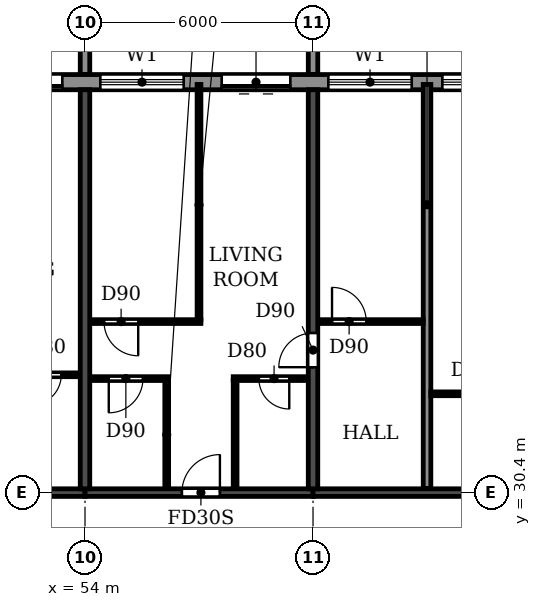
"""IFC4 building model, lengths in metres.
Left out: names, types, materials, properties, quantities, classifications, styles, units other than length and angle.
Written with IfcOpenShell. Run it as: python <this file> out.ifc"""

import sys

from ifc_helpers import new_model, si_unit, direction, frame, frame_2d, origin, place, context, subcontext, project, spatial, polyline, rectangle, outline, extrude, source, transform, mapped, element, fill, save


model = new_model("IFC4")
c1 = context("Model", 3, precision=1e-05, world=origin(), true_north=direction((0.0, 1.0)))
c2 = subcontext(c1, "Body", "Model", "MODEL_VIEW")
j1 = project(units=[si_unit("LENGTHUNIT", "METRE"), si_unit("PLANEANGLEUNIT", "RADIAN")], contexts=[c1])
p1 = place(None, origin())
s1 = spatial("IfcSite", under=j1, at=p1, CompositionType="ELEMENT")
p2 = place(p1, origin())
s2 = spatial("IfcBuilding", under=s1, at=p2, CompositionType="ELEMENT")
p3 = place(p2, frame((0.0, 0.0, 175.2)))
s3 = spatial("IfcBuildingStorey", under=s2, at=p3, CompositionType="ELEMENT", Elevation=175.2)
p4 = place(p3, frame((54.0, 30.5, 0.0), z_axis=(0.0, 0.0, 1.0), x_axis=(0.0, 1.0, 0.0)))
e1 = element("IfcWall", 1, at=p4, inside=s3, PredefinedType="SHEAR", context=c2, shape_type="SweptSolid", body=[
    extrude(rectangle(XDim=10.5, YDim=0.25, at=frame_2d((5.25, 0.0))), origin(), (0.0, 0.0, 1.0), 3.08),
])
p5 = place(p3, frame((60.0, 30.5, 0.0), z_axis=(0.0, 0.0, 1.0), x_axis=(0.0, 1.0, 0.0)))
e2 = element("IfcWall", 2, at=p5, inside=s3, PredefinedType="SHEAR", context=c2, shape_type="SweptSolid", body=[
    extrude(rectangle(XDim=10.5, YDim=0.25, at=frame_2d((5.25, 0.0))), origin(), (0.0, 0.0, 1.0), 3.08),
])
p6 = place(p5, frame((3.2, 0.0, 0.0)))
e3 = element("IfcOpeningElement", 3, at=p6, cuts=e2, PredefinedType="OPENING", context=c2, shape_type="SweptSolid", body=[
    extrude(rectangle(XDim=0.9, YDim=2.1, at=frame_2d((0.45, 1.05))), frame((0.0, 0.135, 0.0), z_axis=(0.0, -1.0, 0.0), x_axis=(1.0, 0.0, 0.0)), (0.0, 0.0, 1.0), 0.27),
])
p7 = place(p3, frame((48.0, 30.4, 0.0), z_axis=(0.0, 0.0, 1.0), x_axis=(1.0, 0.0, 0.0)))
e4 = element("IfcWall", 4, at=p7, inside=s3, PredefinedType="SHEAR", context=c2, shape_type="SweptSolid", body=[
    extrude(rectangle(XDim=6.0, YDim=0.2, at=frame_2d((3.0, 0.0))), origin(), (0.0, 0.0, 1.0), 2.48),
])
p8 = place(p7, frame((2.55, 0.0, 0.0)))
e5 = element("IfcOpeningElement", 5, at=p8, cuts=e4, PredefinedType="OPENING", context=c2, shape_type="SweptSolid", body=[
    extrude(rectangle(XDim=1.0, YDim=2.1, at=frame_2d((0.5, 1.05))), frame((0.0, 0.11, 0.0), z_axis=(0.0, -1.0, 0.0), x_axis=(1.0, 0.0, 0.0)), (0.0, 0.0, 1.0), 0.22),
])
p9 = place(p3, frame((54.0, 30.4, 0.0), z_axis=(0.0, 0.0, 1.0), x_axis=(1.0, 0.0, 0.0)))
e6 = element("IfcWall", 6, at=p9, inside=s3, PredefinedType="SHEAR", context=c2, shape_type="SweptSolid", body=[
    extrude(rectangle(XDim=6.0, YDim=0.2, at=frame_2d((3.0, 0.0))), origin(), (0.0, 0.0, 1.0), 2.48),
])
p10 = place(p9, frame((2.55, 0.0, 0.0)))
e7 = element("IfcOpeningElement", 7, at=p10, cuts=e6, PredefinedType="OPENING", context=c2, shape_type="SweptSolid", body=[
    extrude(rectangle(XDim=1.0, YDim=2.1, at=frame_2d((0.5, 1.05))), frame((0.0, 0.11, 0.0), z_axis=(0.0, -1.0, 0.0), x_axis=(1.0, 0.0, 0.0)), (0.0, 0.0, 1.0), 0.22),
])
p11 = place(p3, frame((60.0, 30.4, 0.0), z_axis=(0.0, 0.0, 1.0), x_axis=(1.0, 0.0, 0.0)))
e8 = element("IfcWall", 8, at=p11, inside=s3, PredefinedType="SHEAR", context=c2, shape_type="SweptSolid", body=[
    extrude(rectangle(XDim=6.0, YDim=0.2, at=frame_2d((3.0, 0.0))), origin(), (0.0, 0.0, 1.0), 2.48),
])
p12 = place(p3, frame((79.317, 41.2, 0.0), z_axis=(0.0, 0.0, 1.0), x_axis=(-1.0, 0.0, 0.0)))
e9 = element("IfcWall", 9, at=p12, inside=s3, PredefinedType="STANDARD", context=c2, shape_type="SweptSolid", body=[
    extrude(rectangle(XDim=56.634, YDim=0.4, at=frame_2d((28.317, 0.0))), origin(), (0.0, 0.0, 1.0), 3.08),
])
p13 = place(p12, frame((52.717, 0.0, 0.9)))
e10 = element("IfcOpeningElement", 10, at=p13, cuts=e9, PredefinedType="OPENING", context=c2, shape_type="SweptSolid", body=[
    extrude(rectangle(XDim=2.2, YDim=1.5, at=frame_2d((1.1, 0.75))), frame((0.0, 0.21, 0.0), z_axis=(0.0, -1.0, 0.0), x_axis=(1.0, 0.0, 0.0)), (0.0, 0.0, 1.0), 0.42),
])
p14 = place(p12, frame((49.917, 0.0, 0.0)))
e11 = element("IfcOpeningElement", 11, at=p14, cuts=e9, PredefinedType="OPENING", context=c2, shape_type="SweptSolid", body=[
    extrude(rectangle(XDim=1.8, YDim=2.4, at=frame_2d((0.9, 1.2))), frame((0.0, 0.21, 0.0), z_axis=(0.0, -1.0, 0.0), x_axis=(1.0, 0.0, 0.0)), (0.0, 0.0, 1.0), 0.42),
])
p15 = place(p12, frame((46.717, 0.0, 0.9)))
e12 = element("IfcOpeningElement", 12, at=p15, cuts=e9, PredefinedType="OPENING", context=c2, shape_type="SweptSolid", body=[
    extrude(rectangle(XDim=2.2, YDim=1.5, at=frame_2d((1.1, 0.75))), frame((0.0, 0.21, 0.0), z_axis=(0.0, -1.0, 0.0), x_axis=(1.0, 0.0, 0.0)), (0.0, 0.0, 1.0), 0.42),
])
p16 = place(p12, frame((43.717, 0.0, 0.9)))
e13 = element("IfcOpeningElement", 13, at=p16, cuts=e9, PredefinedType="OPENING", context=c2, shape_type="SweptSolid", body=[
    extrude(rectangle(XDim=2.2, YDim=1.5, at=frame_2d((1.1, 0.75))), frame((0.0, 0.21, 0.0), z_axis=(0.0, -1.0, 0.0), x_axis=(1.0, 0.0, 0.0)), (0.0, 0.0, 1.0), 0.42),
])
p17 = place(p12, frame((40.917, 0.0, 0.0)))
e14 = element("IfcOpeningElement", 14, at=p17, cuts=e9, PredefinedType="OPENING", context=c2, shape_type="SweptSolid", body=[
    extrude(rectangle(XDim=1.8, YDim=2.4, at=frame_2d((0.9, 1.2))), frame((0.0, 0.21, 0.0), z_axis=(0.0, -1.0, 0.0), x_axis=(1.0, 0.0, 0.0)), (0.0, 0.0, 1.0), 0.42),
])
p18 = place(p12, frame((37.717, 0.0, 0.9)))
e15 = element("IfcOpeningElement", 15, at=p18, cuts=e9, PredefinedType="OPENING", context=c2, shape_type="SweptSolid", body=[
    extrude(rectangle(XDim=2.2, YDim=1.5, at=frame_2d((1.1, 0.75))), frame((0.0, 0.21, 0.0), z_axis=(0.0, -1.0, 0.0), x_axis=(1.0, 0.0, 0.0)), (0.0, 0.0, 1.0), 0.42),
])
p19 = place(p12, frame((34.717, 0.0, 0.9)))
e16 = element("IfcOpeningElement", 16, at=p19, cuts=e9, PredefinedType="OPENING", context=c2, shape_type="SweptSolid", body=[
    extrude(rectangle(XDim=2.2, YDim=1.5, at=frame_2d((1.1, 0.75))), frame((0.0, 0.21, 0.0), z_axis=(0.0, -1.0, 0.0), x_axis=(1.0, 0.0, 0.0)), (0.0, 0.0, 1.0), 0.42),
])
p20 = place(p12, frame((31.717, 0.0, 0.9)))
e17 = element("IfcOpeningElement", 17, at=p20, cuts=e9, PredefinedType="OPENING", context=c2, shape_type="SweptSolid", body=[
    extrude(rectangle(XDim=2.2, YDim=1.5, at=frame_2d((1.1, 0.75))), frame((0.0, 0.21, 0.0), z_axis=(0.0, -1.0, 0.0), x_axis=(1.0, 0.0, 0.0)), (0.0, 0.0, 1.0), 0.42),
])
p21 = place(p12, frame((28.717, 0.0, 0.9)))
e18 = element("IfcOpeningElement", 18, at=p21, cuts=e9, PredefinedType="OPENING", context=c2, shape_type="SweptSolid", body=[
    extrude(rectangle(XDim=2.2, YDim=1.5, at=frame_2d((1.1, 0.75))), frame((0.0, 0.21, 0.0), z_axis=(0.0, -1.0, 0.0), x_axis=(1.0, 0.0, 0.0)), (0.0, 0.0, 1.0), 0.42),
])
p22 = place(p12, frame((25.917, 0.0, 0.0)))
e19 = element("IfcOpeningElement", 19, at=p22, cuts=e9, PredefinedType="OPENING", context=c2, shape_type="SweptSolid", body=[
    extrude(rectangle(XDim=1.8, YDim=2.4, at=frame_2d((0.9, 1.2))), frame((0.0, 0.21, 0.0), z_axis=(0.0, -1.0, 0.0), x_axis=(1.0, 0.0, 0.0)), (0.0, 0.0, 1.0), 0.42),
])
p23 = place(p12, frame((22.717, 0.0, 0.9)))
e20 = element("IfcOpeningElement", 20, at=p23, cuts=e9, PredefinedType="OPENING", context=c2, shape_type="SweptSolid", body=[
    extrude(rectangle(XDim=2.2, YDim=1.5, at=frame_2d((1.1, 0.75))), frame((0.0, 0.21, 0.0), z_axis=(0.0, -1.0, 0.0), x_axis=(1.0, 0.0, 0.0)), (0.0, 0.0, 1.0), 0.42),
])
p24 = place(p12, frame((19.917, 0.0, 0.0)))
e21 = element("IfcOpeningElement", 21, at=p24, cuts=e9, PredefinedType="OPENING", context=c2, shape_type="SweptSolid", body=[
    extrude(rectangle(XDim=1.8, YDim=2.4, at=frame_2d((0.9, 1.2))), frame((0.0, 0.21, 0.0), z_axis=(0.0, -1.0, 0.0), x_axis=(1.0, 0.0, 0.0)), (0.0, 0.0, 1.0), 0.42),
])
p25 = place(p12, frame((16.717, 0.0, 0.9)))
e22 = element("IfcOpeningElement", 22, at=p25, cuts=e9, PredefinedType="OPENING", context=c2, shape_type="SweptSolid", body=[
    extrude(rectangle(XDim=2.2, YDim=1.5, at=frame_2d((1.1, 0.75))), frame((0.0, 0.21, 0.0), z_axis=(0.0, -1.0, 0.0), x_axis=(1.0, 0.0, 0.0)), (0.0, 0.0, 1.0), 0.42),
])
p26 = place(p12, frame((13.717, 0.0, 0.9)))
e23 = element("IfcOpeningElement", 23, at=p26, cuts=e9, PredefinedType="OPENING", context=c2, shape_type="SweptSolid", body=[
    extrude(rectangle(XDim=2.2, YDim=1.5, at=frame_2d((1.1, 0.75))), frame((0.0, 0.21, 0.0), z_axis=(0.0, -1.0, 0.0), x_axis=(1.0, 0.0, 0.0)), (0.0, 0.0, 1.0), 0.42),
])
p27 = place(p12, frame((10.917, 0.0, 0.0)))
e24 = element("IfcOpeningElement", 24, at=p27, cuts=e9, PredefinedType="OPENING", context=c2, shape_type="SweptSolid", body=[
    extrude(rectangle(XDim=1.8, YDim=2.4, at=frame_2d((0.9, 1.2))), frame((0.0, 0.21, 0.0), z_axis=(0.0, -1.0, 0.0), x_axis=(1.0, 0.0, 0.0)), (0.0, 0.0, 1.0), 0.42),
])
p28 = place(p12, frame((7.717, 0.0, 0.9)))
e25 = element("IfcOpeningElement", 25, at=p28, cuts=e9, PredefinedType="OPENING", context=c2, shape_type="SweptSolid", body=[
    extrude(rectangle(XDim=2.2, YDim=1.5, at=frame_2d((1.1, 0.75))), frame((0.0, 0.21, 0.0), z_axis=(0.0, -1.0, 0.0), x_axis=(1.0, 0.0, 0.0)), (0.0, 0.0, 1.0), 0.42),
])
p29 = place(p12, frame((4.717, 0.0, 0.9)))
e26 = element("IfcOpeningElement", 26, at=p29, cuts=e9, PredefinedType="OPENING", context=c2, shape_type="SweptSolid", body=[
    extrude(rectangle(XDim=2.2, YDim=1.5, at=frame_2d((1.1, 0.75))), frame((0.0, 0.21, 0.0), z_axis=(0.0, -1.0, 0.0), x_axis=(1.0, 0.0, 0.0)), (0.0, 0.0, 1.0), 0.42),
])
p30 = place(p12, frame((1.917, 0.0, 0.0)))
e27 = element("IfcOpeningElement", 27, at=p30, cuts=e9, PredefinedType="OPENING", context=c2, shape_type="SweptSolid", body=[
    extrude(rectangle(XDim=1.8, YDim=2.4, at=frame_2d((0.9, 1.2))), frame((0.0, 0.21, 0.0), z_axis=(0.0, -1.0, 0.0), x_axis=(1.0, 0.0, 0.0)), (0.0, 0.0, 1.0), 0.42),
])
m1 = source(origin(), c2, "Body", "SweptSolid", [
    extrude(outline(polyline([(0.0, 0.0), (0.25, 0.0), (0.25, 3.1), (0.0, 3.1), (0.0, 0.0)])), origin(), (0.0, 0.0, 1.0), 3.1),
])
for number, where in (
    (28, (53.875, 41.4, 0.0)),
    (29, (59.875, 41.4, 0.0)),
):
    element("IfcWall", number, at=place(p3, frame(where)), inside=s3, PredefinedType="STANDARD", context=c2, shape_type="MappedRepresentation", body=[
        mapped(m1, transform((0.0, 0.0, 0.0))),
    ])
p31 = place(p3, frame((63.0, 30.51, 0.0), z_axis=(0.0, 0.0, 1.0), x_axis=(0.0, 1.0, 0.0)))
e30 = element("IfcWall", 30, at=p31, inside=s3, PredefinedType="PARTITIONING", context=c2, shape_type="SweptSolid", body=[
    extrude(rectangle(XDim=10.63, YDim=0.2, at=frame_2d((5.315, 0.0))), origin(), (0.0, 0.0, 1.0), 3.08),
])
p32 = place(p3, frame((63.1, 33.0, 0.0), z_axis=(0.0, 0.0, 1.0), x_axis=(1.0, 0.0, 0.0)))
e31 = element("IfcWall", 31, at=p32, inside=s3, PredefinedType="PARTITIONING", context=c2, shape_type="SweptSolid", body=[
    extrude(rectangle(XDim=2.765, YDim=0.1, at=frame_2d((1.382, 0.0))), origin(), (0.0, 0.0, 1.0), 3.08),
])
p33 = place(p32, frame((1.0, 0.0, 0.0)))
e32 = element("IfcOpeningElement", 32, at=p33, cuts=e31, PredefinedType="OPENING", context=c2, shape_type="SweptSolid", body=[
    extrude(rectangle(XDim=0.8, YDim=2.1, at=frame_2d((0.4, 1.05))), frame((0.0, 0.06, 0.0), z_axis=(0.0, -1.0, 0.0), x_axis=(1.0, 0.0, 0.0)), (0.0, 0.0, 1.0), 0.12),
])
p34 = place(p3, frame((54.135, 33.4, 0.0), z_axis=(0.0, 0.0, 1.0), x_axis=(1.0, 0.0, 0.0)))
e33 = element("IfcWall", 33, at=p34, inside=s3, PredefinedType="PARTITIONING", context=c2, shape_type="SweptSolid", body=[
    extrude(rectangle(XDim=2.065, YDim=0.1, at=frame_2d((1.032, 0.0))), origin(), (0.0, 0.0, 1.0), 3.08),
])
p35 = place(p34, frame((0.49, 0.0, 0.0)))
e34 = element("IfcOpeningElement", 34, at=p35, cuts=e33, PredefinedType="OPENING", context=c2, shape_type="SweptSolid", body=[
    extrude(rectangle(XDim=0.9, YDim=2.1, at=frame_2d((0.45, 1.05))), frame((0.0, 0.06, 0.0), z_axis=(0.0, -1.0, 0.0), x_axis=(1.0, 0.0, 0.0)), (0.0, 0.0, 1.0), 0.12),
])
p36 = place(p3, frame((57.9, 33.4, 0.0), z_axis=(0.0, 0.0, 1.0), x_axis=(1.0, 0.0, 0.0)))
e35 = element("IfcWall", 35, at=p36, inside=s3, PredefinedType="PARTITIONING", context=c2, shape_type="SweptSolid", body=[
    extrude(rectangle(XDim=1.965, YDim=0.1, at=frame_2d((0.982, 0.0))), origin(), (0.0, 0.0, 1.0), 3.08),
])
p37 = place(p36, frame((0.675, 0.0, 0.0)))
e36 = element("IfcOpeningElement", 36, at=p37, cuts=e35, PredefinedType="OPENING", context=c2, shape_type="SweptSolid", body=[
    extrude(rectangle(XDim=0.8, YDim=2.1, at=frame_2d((0.4, 1.05))), frame((0.0, 0.06, 0.0), z_axis=(0.0, -1.0, 0.0), x_axis=(1.0, 0.0, 0.0)), (0.0, 0.0, 1.0), 0.12),
])
p38 = place(p3, frame((51.9, 33.5, 0.0), z_axis=(0.0, 0.0, 1.0), x_axis=(1.0, 0.0, 0.0)))
e37 = element("IfcWall", 37, at=p38, inside=s3, PredefinedType="PARTITIONING", context=c2, shape_type="SweptSolid", body=[
    extrude(rectangle(XDim=1.965, YDim=0.1, at=frame_2d((0.982, 0.0))), origin(), (0.0, 0.0, 1.0), 3.08),
])
p39 = place(p38, frame((0.675, 0.0, 0.0)))
e38 = element("IfcOpeningElement", 38, at=p39, cuts=e37, PredefinedType="OPENING", context=c2, shape_type="SweptSolid", body=[
    extrude(rectangle(XDim=0.8, YDim=2.1, at=frame_2d((0.4, 1.05))), frame((0.0, 0.06, 0.0), z_axis=(0.0, -1.0, 0.0), x_axis=(1.0, 0.0, 0.0)), (0.0, 0.0, 1.0), 0.12),
])
p40 = place(p3, frame((54.135, 34.9, 0.0), z_axis=(0.0, 0.0, 1.0), x_axis=(1.0, 0.0, 0.0)))
e39 = element("IfcWall", 39, at=p40, inside=s3, PredefinedType="PARTITIONING", context=c2, shape_type="SweptSolid", body=[
    extrude(rectangle(XDim=2.915, YDim=0.1, at=frame_2d((1.458, 0.0))), origin(), (0.0, 0.0, 1.0), 3.08),
])
p41 = place(p40, frame((0.365, 0.0, 0.0)))
e40 = element("IfcOpeningElement", 40, at=p41, cuts=e39, PredefinedType="OPENING", context=c2, shape_type="SweptSolid", body=[
    extrude(rectangle(XDim=0.9, YDim=2.1, at=frame_2d((0.45, 1.05))), frame((0.0, 0.06, 0.0), z_axis=(0.0, -1.0, 0.0), x_axis=(1.0, 0.0, 0.0)), (0.0, 0.0, 1.0), 0.12),
])
p42 = place(p3, frame((60.135, 34.9, 0.0), z_axis=(0.0, 0.0, 1.0), x_axis=(1.0, 0.0, 0.0)))
e41 = element("IfcWall", 41, at=p42, inside=s3, PredefinedType="PARTITIONING", context=c2, shape_type="SweptSolid", body=[
    extrude(rectangle(XDim=2.765, YDim=0.1, at=frame_2d((1.382, 0.0))), origin(), (0.0, 0.0, 1.0), 3.08),
])
p43 = place(p42, frame((0.365, 0.0, 0.0)))
e42 = element("IfcOpeningElement", 42, at=p43, cuts=e41, PredefinedType="OPENING", context=c2, shape_type="SweptSolid", body=[
    extrude(rectangle(XDim=0.9, YDim=2.1, at=frame_2d((0.45, 1.05))), frame((0.0, 0.06, 0.0), z_axis=(0.0, -1.0, 0.0), x_axis=(1.0, 0.0, 0.0)), (0.0, 0.0, 1.0), 0.12),
])
p44 = place(p3, frame((56.15, 30.51, 0.0), z_axis=(0.0, 0.0, 1.0), x_axis=(0.0, 1.0, 0.0)))
e43 = element("IfcWall", 43, at=p44, inside=s3, PredefinedType="PARTITIONING", context=c2, shape_type="SweptSolid", body=[
    extrude(rectangle(XDim=2.84, YDim=0.1, at=frame_2d((1.42, 0.0))), origin(), (0.0, 0.0, 1.0), 3.08),
])
p45 = place(p3, frame((57.0, 34.95, 0.0), z_axis=(0.0, 0.0, 1.0), x_axis=(0.0, 1.0, 0.0)))
e44 = element("IfcWall", 44, at=p45, inside=s3, PredefinedType="PARTITIONING", context=c2, shape_type="SweptSolid", body=[
    extrude(rectangle(XDim=6.19, YDim=0.1, at=frame_2d((3.095, 0.0))), origin(), (0.0, 0.0, 1.0), 3.08),
])
p46 = place(p3, frame((57.95, 30.51, 0.0), z_axis=(0.0, 0.0, 1.0), x_axis=(0.0, 1.0, 0.0)))
e45 = element("IfcWall", 45, at=p46, inside=s3, PredefinedType="PARTITIONING", context=c2, shape_type="SweptSolid", body=[
    extrude(rectangle(XDim=2.84, YDim=0.1, at=frame_2d((1.42, 0.0))), origin(), (0.0, 0.0, 1.0), 3.08),
])
p47 = place(p22, origin())
e46 = element("IfcDoor", 46, at=p47, inside=s3, OperationType="DOUBLE_DOOR_SLIDING", PredefinedType="DOOR", context=c2, shape_type="SweptSolid", body=[
    extrude(rectangle(XDim=1.8, YDim=2.4, at=frame_2d((0.9, 1.2))), frame((0.0, 0.025, 0.0), z_axis=(0.0, -1.0, 0.0), x_axis=(1.0, 0.0, 0.0)), (0.0, 0.0, 1.0), 0.05),
])
fill(e19, e46)
p48 = place(p23, origin())
e47 = element("IfcWindow", 47, at=p48, inside=s3, PartitioningType="DOUBLE_PANEL_HORIZONTAL", PredefinedType="WINDOW", context=c2, shape_type="SweptSolid", body=[
    extrude(rectangle(XDim=2.2, YDim=1.5, at=frame_2d((1.1, 0.75))), frame((0.0, 0.03, 0.0), z_axis=(0.0, -1.0, 0.0), x_axis=(1.0, 0.0, 0.0)), (0.0, 0.0, 1.0), 0.06),
])
fill(e20, e47)
p49 = place(p24, origin())
e48 = element("IfcDoor", 48, at=p49, inside=s3, OperationType="DOUBLE_DOOR_SLIDING", PredefinedType="DOOR", context=c2, shape_type="SweptSolid", body=[
    extrude(rectangle(XDim=1.8, YDim=2.4, at=frame_2d((0.9, 1.2))), frame((0.0, 0.025, 0.0), z_axis=(0.0, -1.0, 0.0), x_axis=(1.0, 0.0, 0.0)), (0.0, 0.0, 1.0), 0.05),
])
fill(e21, e48)
p50 = place(p25, origin())
e49 = element("IfcWindow", 49, at=p50, inside=s3, PartitioningType="DOUBLE_PANEL_HORIZONTAL", PredefinedType="WINDOW", context=c2, shape_type="SweptSolid", body=[
    extrude(rectangle(XDim=2.2, YDim=1.5, at=frame_2d((1.1, 0.75))), frame((0.0, 0.03, 0.0), z_axis=(0.0, -1.0, 0.0), x_axis=(1.0, 0.0, 0.0)), (0.0, 0.0, 1.0), 0.06),
])
fill(e22, e49)
p51 = place(p26, origin())
e50 = element("IfcWindow", 50, at=p51, inside=s3, PartitioningType="DOUBLE_PANEL_HORIZONTAL", PredefinedType="WINDOW", context=c2, shape_type="SweptSolid", body=[
    extrude(rectangle(XDim=2.2, YDim=1.5, at=frame_2d((1.1, 0.75))), frame((0.0, 0.03, 0.0), z_axis=(0.0, -1.0, 0.0), x_axis=(1.0, 0.0, 0.0)), (0.0, 0.0, 1.0), 0.06),
])
fill(e23, e50)
p52 = place(p39, frame((0.8, 0.0, 0.0), z_axis=(0.0, 0.0, 1.0), x_axis=(-1.0, 0.0, 0.0)))
e51 = element("IfcDoor", 51, at=p52, inside=s3, OperationType="SINGLE_SWING_RIGHT", PredefinedType="DOOR", context=c2, shape_type="SweptSolid", body=[
    extrude(rectangle(XDim=0.8, YDim=2.1, at=frame_2d((0.4, 1.05))), frame((0.0, 0.025, 0.0), z_axis=(0.0, -1.0, 0.0), x_axis=(1.0, 0.0, 0.0)), (0.0, 0.0, 1.0), 0.05),
])
fill(e38, e51)
p53 = place(p43, origin())
e52 = element("IfcDoor", 52, at=p53, inside=s3, OperationType="SINGLE_SWING_LEFT", PredefinedType="DOOR", context=c2, shape_type="SweptSolid", body=[
    extrude(rectangle(XDim=0.9, YDim=2.1, at=frame_2d((0.45, 1.05))), frame((0.0, 0.025, 0.0), z_axis=(0.0, -1.0, 0.0), x_axis=(1.0, 0.0, 0.0)), (0.0, 0.0, 1.0), 0.05),
])
fill(e42, e52)
p54 = place(p41, frame((0.9, 0.0, 0.0), z_axis=(0.0, 0.0, 1.0), x_axis=(-1.0, 0.0, 0.0)))
e53 = element("IfcDoor", 53, at=p54, inside=s3, OperationType="SINGLE_SWING_LEFT", PredefinedType="DOOR", context=c2, shape_type="SweptSolid", body=[
    extrude(rectangle(XDim=0.9, YDim=2.1, at=frame_2d((0.45, 1.05))), frame((0.0, 0.025, 0.0), z_axis=(0.0, -1.0, 0.0), x_axis=(1.0, 0.0, 0.0)), (0.0, 0.0, 1.0), 0.05),
])
fill(e40, e53)
p55 = place(p35, frame((0.9, 0.0, 0.0), z_axis=(0.0, 0.0, 1.0), x_axis=(-1.0, 0.0, 0.0)))
e54 = element("IfcDoor", 54, at=p55, inside=s3, OperationType="SINGLE_SWING_RIGHT", PredefinedType="DOOR", context=c2, shape_type="SweptSolid", body=[
    extrude(rectangle(XDim=0.9, YDim=2.1, at=frame_2d((0.45, 1.05))), frame((0.0, 0.025, 0.0), z_axis=(0.0, -1.0, 0.0), x_axis=(1.0, 0.0, 0.0)), (0.0, 0.0, 1.0), 0.05),
])
fill(e34, e54)
p56 = place(p10, origin())
e55 = element("IfcDoor", 55, at=p56, inside=s3, OperationType="SINGLE_SWING_RIGHT", PredefinedType="DOOR", context=c2, shape_type="SweptSolid", body=[
    extrude(rectangle(XDim=1.0, YDim=2.1, at=frame_2d((0.5, 1.05))), frame((0.0, 0.025, 0.0), z_axis=(0.0, -1.0, 0.0), x_axis=(1.0, 0.0, 0.0)), (0.0, 0.0, 1.0), 0.05),
])
fill(e7, e55)
p57 = place(p37, frame((0.8, 0.0, 0.0), z_axis=(0.0, 0.0, 1.0), x_axis=(-1.0, 0.0, 0.0)))
e56 = element("IfcDoor", 56, at=p57, inside=s3, OperationType="SINGLE_SWING_LEFT", PredefinedType="DOOR", context=c2, shape_type="SweptSolid", body=[
    extrude(rectangle(XDim=0.8, YDim=2.1, at=frame_2d((0.4, 1.05))), frame((0.0, 0.025, 0.0), z_axis=(0.0, -1.0, 0.0), x_axis=(1.0, 0.0, 0.0)), (0.0, 0.0, 1.0), 0.05),
])
fill(e36, e56)
p58 = place(p6, origin())
e57 = element("IfcDoor", 57, at=p58, inside=s3, OperationType="SINGLE_SWING_LEFT", PredefinedType="DOOR", context=c2, shape_type="SweptSolid", body=[
    extrude(rectangle(XDim=0.9, YDim=2.1, at=frame_2d((0.45, 1.05))), frame((0.0, 0.025, 0.0), z_axis=(0.0, -1.0, 0.0), x_axis=(1.0, 0.0, 0.0)), (0.0, 0.0, 1.0), 0.05),
])
fill(e3, e57)
save(model, sys.argv[1])
